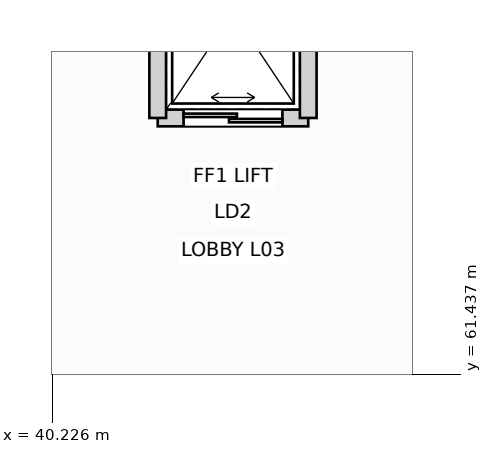
"""IFC4 building model, lengths in metres.
Left out: names, types, materials, properties, quantities, classifications, styles, units other than length and angle.
Written with IfcOpenShell. Run it as: python <this file> out.ifc"""

import sys

from ifc_helpers import new_model, si_unit, direction, frame, frame_2d, origin, place, context, subcontext, project, spatial, rectangle, extrude, element, fill, save


model = new_model("IFC4")
c1 = context("Model", 3, precision=1e-05, world=origin(), true_north=direction((0.0, 1.0)))
c2 = subcontext(c1, "Body", "Model", "MODEL_VIEW")
j1 = project(units=[si_unit("LENGTHUNIT", "METRE"), si_unit("PLANEANGLEUNIT", "RADIAN")], contexts=[c1])
p1 = place(None, origin())
s1 = spatial("IfcSite", under=j1, at=p1, CompositionType="ELEMENT")
p2 = place(p1, origin())
s2 = spatial("IfcBuilding", under=s1, at=p2, CompositionType="ELEMENT")
p3 = place(p2, frame((0.0, 0.0, 16.8)))
s3 = spatial("IfcBuildingStorey", under=s2, at=p3, CompositionType="ELEMENT", Elevation=16.8)
p4 = place(p3, frame((41.61, 64.81, 0.0), z_axis=(0.0, 0.0, 1.0), x_axis=(1.0, 0.0, 0.0)))
e1 = element("IfcWall", 1, at=p4, inside=s3, PredefinedType="PARTITIONING", context=c2, shape_type="SweptSolid", body=[
    extrude(rectangle(XDim=1.98, YDim=0.22, at=frame_2d((0.99, 0.0))), origin(), (0.0, 0.0, 1.0), 4.485),
])
p5 = place(p4, frame((0.34, 0.0, 0.0)))
e2 = element("IfcOpeningElement", 2, at=p5, cuts=e1, PredefinedType="OPENING", context=c2, shape_type="SweptSolid", body=[
    extrude(rectangle(XDim=1.3, YDim=2.2, at=frame_2d((0.65, 1.1))), frame((0.0, 0.12, 0.0), z_axis=(0.0, -1.0, 0.0), x_axis=(1.0, 0.0, 0.0)), (0.0, 0.0, 1.0), 0.24),
])
for number, where, z_axis, x_axis in (
    (3, (41.61, 64.81, 0.0), (0.0, 0.0, 1.0), (0.0, 1.0, 0.0)),
    (4, (43.59, 64.81, 0.0), (0.0, 0.0, 1.0), (0.0, 1.0, 0.0)),
):
    element("IfcWall", number, at=place(p3, frame(where, z_axis=z_axis, x_axis=x_axis)), inside=s3, PredefinedType="PARTITIONING", context=c2, shape_type="SweptSolid", body=[
        extrude(rectangle(XDim=2.78, YDim=0.22, at=frame_2d((1.39, 0.0))), origin(), (0.0, 0.0, 1.0), 4.035),
    ])
p6 = place(p5, origin())
e5 = element("IfcDoor", 5, at=p6, inside=s3, OperationType="DOUBLE_DOOR_SLIDING", PredefinedType="DOOR", context=c2, shape_type="SweptSolid", body=[
    extrude(rectangle(XDim=1.3, YDim=2.2, at=frame_2d((0.65, 1.1))), frame((0.0, 0.025, 0.0), z_axis=(0.0, -1.0, 0.0), x_axis=(1.0, 0.0, 0.0)), (0.0, 0.0, 1.0), 0.05),
])
fill(e2, e5)
save(model, sys.argv[1])
